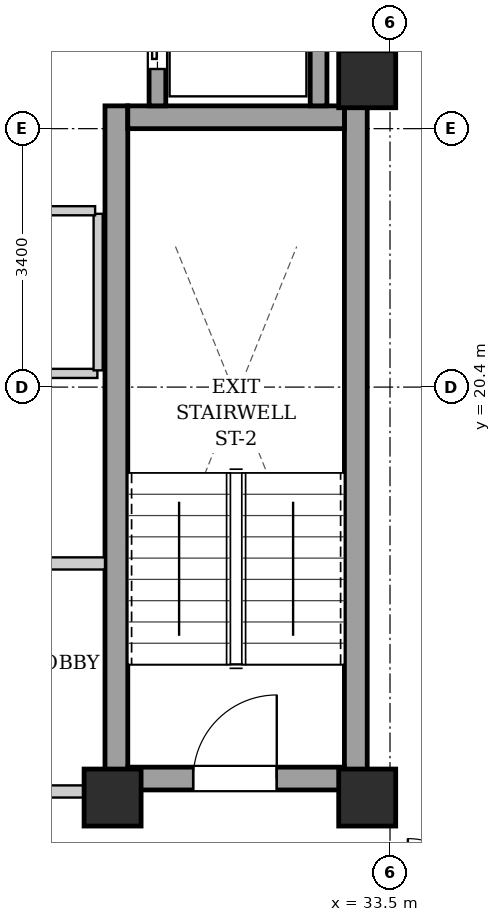
"""IFC4 building model, lengths in metres.
Left out: names, types, materials, properties, quantities, classifications, styles, units other than length and angle.
Written with IfcOpenShell. Run it as: python <this file> out.ifc"""

import sys

from ifc_helpers import new_model, si_unit, direction, frame, frame_2d, origin, origin_2d, place, context, subcontext, project, spatial, rectangle, extrude, element, fill, save


model = new_model("IFC4")
c1 = context("Model", 3, precision=1e-05, world=origin(), true_north=direction((0.0, 1.0)))
c2 = subcontext(c1, "Body", "Model", "MODEL_VIEW")
j1 = project(units=[si_unit("LENGTHUNIT", "METRE"), si_unit("PLANEANGLEUNIT", "RADIAN")], contexts=[c1])
p1 = place(None, origin())
s1 = spatial("IfcSite", under=j1, at=p1, CompositionType="ELEMENT")
p2 = place(p1, origin())
s2 = spatial("IfcBuilding", under=s1, at=p2, CompositionType="ELEMENT")
p3 = place(p2, frame((0.0, 0.0, 234.3)))
s3 = spatial("IfcBuildingStorey", under=s2, at=p3, CompositionType="ELEMENT", Elevation=234.3)
for number, where, z_axis, x_axis in (
    (1, (29.85, 15.0, 0.0), (0.0, 0.0, 1.0), (1.0, 0.0, 0.0)),
    (2, (33.2, 15.0, 0.0), (0.0, 0.0, 1.0), (1.0, 0.0, 0.0)),
    (3, (33.2, 24.45, 0.0), (0.0, 0.0, 1.0), (1.0, 0.0, 0.0)),
):
    element("IfcColumn", number, at=place(p3, frame(where, z_axis=z_axis, x_axis=x_axis)), inside=s3, PredefinedType="COLUMN", context=c2, shape_type="SweptSolid", body=[
        extrude(rectangle(XDim=0.75, YDim=0.75, at=origin_2d()), origin(), (0.0, 0.0, 1.0), 3.4),
    ])
for number, where, z_axis, x_axis in (
    (4, (29.9, 15.1, 0.0), (0.0, 0.0, 1.0), (0.0, 1.0, 0.0)),
    (5, (33.05, 15.1, 0.0), (0.0, 0.0, 1.0), (0.0, 1.0, 0.0)),
):
    element("IfcWall", number, at=place(p3, frame(where, z_axis=z_axis, x_axis=x_axis)), inside=s3, PredefinedType="SHEAR", context=c2, shape_type="SweptSolid", body=[
        extrude(rectangle(XDim=9.0, YDim=0.3, at=frame_2d((4.5, 0.0))), origin(), (0.0, 0.0, 1.0), 3.14),
    ])
p4 = place(p3, frame((30.05, 23.95, 0.0), z_axis=(0.0, 0.0, 1.0), x_axis=(1.0, 0.0, 0.0)))
e6 = element("IfcWall", 6, at=p4, inside=s3, PredefinedType="SHEAR", context=c2, shape_type="SweptSolid", body=[
    extrude(rectangle(XDim=2.85, YDim=0.3, at=frame_2d((1.425, 0.0))), origin(), (0.0, 0.0, 1.0), 3.14),
])
p5 = place(p3, frame((30.05, 15.25, 0.0), z_axis=(0.0, 0.0, 1.0), x_axis=(1.0, 0.0, 0.0)))
e7 = element("IfcWall", 7, at=p5, inside=s3, PredefinedType="SHEAR", context=c2, shape_type="SweptSolid", body=[
    extrude(rectangle(XDim=2.85, YDim=0.3, at=frame_2d((1.425, 0.0))), origin(), (0.0, 0.0, 1.0), 3.14),
])
p6 = place(p5, frame((0.86, 0.0, 0.0)))
e8 = element("IfcOpeningElement", 8, at=p6, cuts=e7, PredefinedType="OPENING", context=c2, shape_type="SweptSolid", body=[
    extrude(rectangle(XDim=1.1, YDim=2.05, at=frame_2d((0.55, 1.025))), frame((0.0, 0.16, 0.0), z_axis=(0.0, -1.0, 0.0), x_axis=(1.0, 0.0, 0.0)), (0.0, 0.0, 1.0), 0.32),
])
p7 = place(p3, frame((30.44, 24.1, 0.0), z_axis=(0.0, 0.0, 1.0), x_axis=(0.0, 1.0, 0.0)))
e9 = element("IfcWall", 9, at=p7, inside=s3, PredefinedType="SHEAR", context=c2, shape_type="SweptSolid", body=[
    extrude(rectangle(XDim=2.07, YDim=0.22, at=frame_2d((1.035, 0.0))), origin(), (0.0, 0.0, 1.0), 3.14),
])
p8 = place(p7, frame((0.485, 0.0, 0.0)))
e10 = element("IfcOpeningElement", 10, at=p8, cuts=e9, PredefinedType="OPENING", context=c2, shape_type="SweptSolid", body=[
    extrude(rectangle(XDim=1.1, YDim=2.15, at=frame_2d((0.55, 1.075))), frame((0.0, 0.12, 0.0), z_axis=(0.0, -1.0, 0.0), x_axis=(1.0, 0.0, 0.0)), (0.0, 0.0, 1.0), 0.24),
])
p9 = place(p3, frame((32.56, 24.1, 0.0), z_axis=(0.0, 0.0, 1.0), x_axis=(0.0, 1.0, 0.0)))
e11 = element("IfcWall", 11, at=p9, inside=s3, PredefinedType="SHEAR", context=c2, shape_type="SweptSolid", body=[
    extrude(rectangle(XDim=2.07, YDim=0.22, at=frame_2d((1.035, 0.0))), origin(), (0.0, 0.0, 1.0), 3.14),
])
p10 = place(p3, frame((21.25, 15.08, 0.0), z_axis=(0.0, 0.0, 1.0), x_axis=(1.0, 0.0, 0.0)))
e12 = element("IfcWall", 12, at=p10, inside=s3, PredefinedType="PARTITIONING", context=c2, shape_type="SweptSolid", body=[
    extrude(rectangle(XDim=8.5, YDim=0.16, at=frame_2d((4.25, 0.0))), origin(), (0.0, 0.0, 1.0), 2.668),
])
p11 = place(p10, frame((3.725, 0.0, 0.0)))
e13 = element("IfcOpeningElement", 13, at=p11, cuts=e12, PredefinedType="OPENING", context=c2, shape_type="SweptSolid", body=[
    extrude(rectangle(XDim=1.05, YDim=2.05, at=frame_2d((0.525, 1.025))), frame((0.0, 0.09, 0.0), z_axis=(0.0, -1.0, 0.0), x_axis=(1.0, 0.0, 0.0)), (0.0, 0.0, 1.0), 0.18),
])
p12 = place(p3, frame((28.65, 18.08, 0.0), z_axis=(0.0, 0.0, 1.0), x_axis=(1.0, 0.0, 0.0)))
e14 = element("IfcWall", 14, at=p12, inside=s3, PredefinedType="PARTITIONING", context=c2, shape_type="SweptSolid", body=[
    extrude(rectangle(XDim=1.1, YDim=0.16, at=frame_2d((0.55, 0.0))), origin(), (0.0, 0.0, 1.0), 3.14),
])
p13 = place(p3, frame((33.12, 24.12, 0.0), z_axis=(0.0, 0.0, 1.0), x_axis=(0.0, 1.0, 0.0)))
e15 = element("IfcWall", 15, at=p13, inside=s3, PredefinedType="PARTITIONING", context=c2, shape_type="SweptSolid", body=[
    extrude(rectangle(XDim=4.76, YDim=0.16, at=frame_2d((2.38, 0.0))), origin(), (0.0, 0.0, 1.0), 3.14),
])
p14 = place(p3, frame((22.3, 20.58, 0.0), z_axis=(0.0, 0.0, 1.0), x_axis=(1.0, 0.0, 0.0)))
e16 = element("IfcWall", 16, at=p14, inside=s3, PredefinedType="PARTITIONING", context=c2, shape_type="SweptSolid", body=[
    extrude(rectangle(XDim=7.35, YDim=0.12, at=frame_2d((3.675, 0.0))), origin(), (0.0, 0.0, 1.0), 3.14),
])
p15 = place(p3, frame((29.66, 20.62, 0.0), z_axis=(0.0, 0.0, 1.0), x_axis=(0.0, 1.0, 0.0)))
e17 = element("IfcWall", 17, at=p15, inside=s3, PredefinedType="PARTITIONING", context=c2, shape_type="SweptSolid", body=[
    extrude(rectangle(XDim=2.06, YDim=0.12, at=frame_2d((1.03, 0.0))), origin(), (0.0, 0.0, 1.0), 3.14),
])
p16 = place(p3, frame((22.35, 22.72, 0.0), z_axis=(0.0, 0.0, 1.0), x_axis=(1.0, 0.0, 0.0)))
e18 = element("IfcWall", 18, at=p16, inside=s3, PredefinedType="PARTITIONING", context=c2, shape_type="SweptSolid", body=[
    extrude(rectangle(XDim=7.27, YDim=0.12, at=frame_2d((3.635, 0.0))), origin(), (0.0, 0.0, 1.0), 3.14),
])
p17 = place(p16, frame((1.175, 0.0, 0.0)))
e19 = element("IfcOpeningElement", 19, at=p17, cuts=e18, PredefinedType="OPENING", context=c2, shape_type="SweptSolid", body=[
    extrude(rectangle(XDim=0.9, YDim=2.05, at=frame_2d((0.45, 1.025))), frame((0.0, 0.07, 0.0), z_axis=(0.0, -1.0, 0.0), x_axis=(1.0, 0.0, 0.0)), (0.0, 0.0, 1.0), 0.14),
])
p18 = place(p16, frame((4.725, 0.0, 0.0)))
e20 = element("IfcOpeningElement", 20, at=p18, cuts=e18, PredefinedType="OPENING", context=c2, shape_type="SweptSolid", body=[
    extrude(rectangle(XDim=0.9, YDim=2.05, at=frame_2d((0.45, 1.025))), frame((0.0, 0.07, 0.0), z_axis=(0.0, -1.0, 0.0), x_axis=(1.0, 0.0, 0.0)), (0.0, 0.0, 1.0), 0.14),
])
p19 = place(p6, origin())
e21 = element("IfcDoor", 21, at=p19, inside=s3, OperationType="SINGLE_SWING_RIGHT", PredefinedType="DOOR", context=c2, shape_type="SweptSolid", body=[
    extrude(rectangle(XDim=1.1, YDim=2.05, at=frame_2d((0.55, 1.025))), frame((0.0, 0.025, 0.0), z_axis=(0.0, -1.0, 0.0), x_axis=(1.0, 0.0, 0.0)), (0.0, 0.0, 1.0), 0.05),
])
fill(e8, e21)
p20 = place(p8, origin())
e22 = element("IfcDoor", 22, at=p20, inside=s3, OperationType="SLIDING_TO_LEFT", PredefinedType="DOOR", context=c2, shape_type="SweptSolid", body=[
    extrude(rectangle(XDim=1.1, YDim=2.15, at=frame_2d((0.55, 1.075))), frame((0.0, 0.025, 0.0), z_axis=(0.0, -1.0, 0.0), x_axis=(1.0, 0.0, 0.0)), (0.0, 0.0, 1.0), 0.05),
])
fill(e10, e22)
save(model, sys.argv[1])
